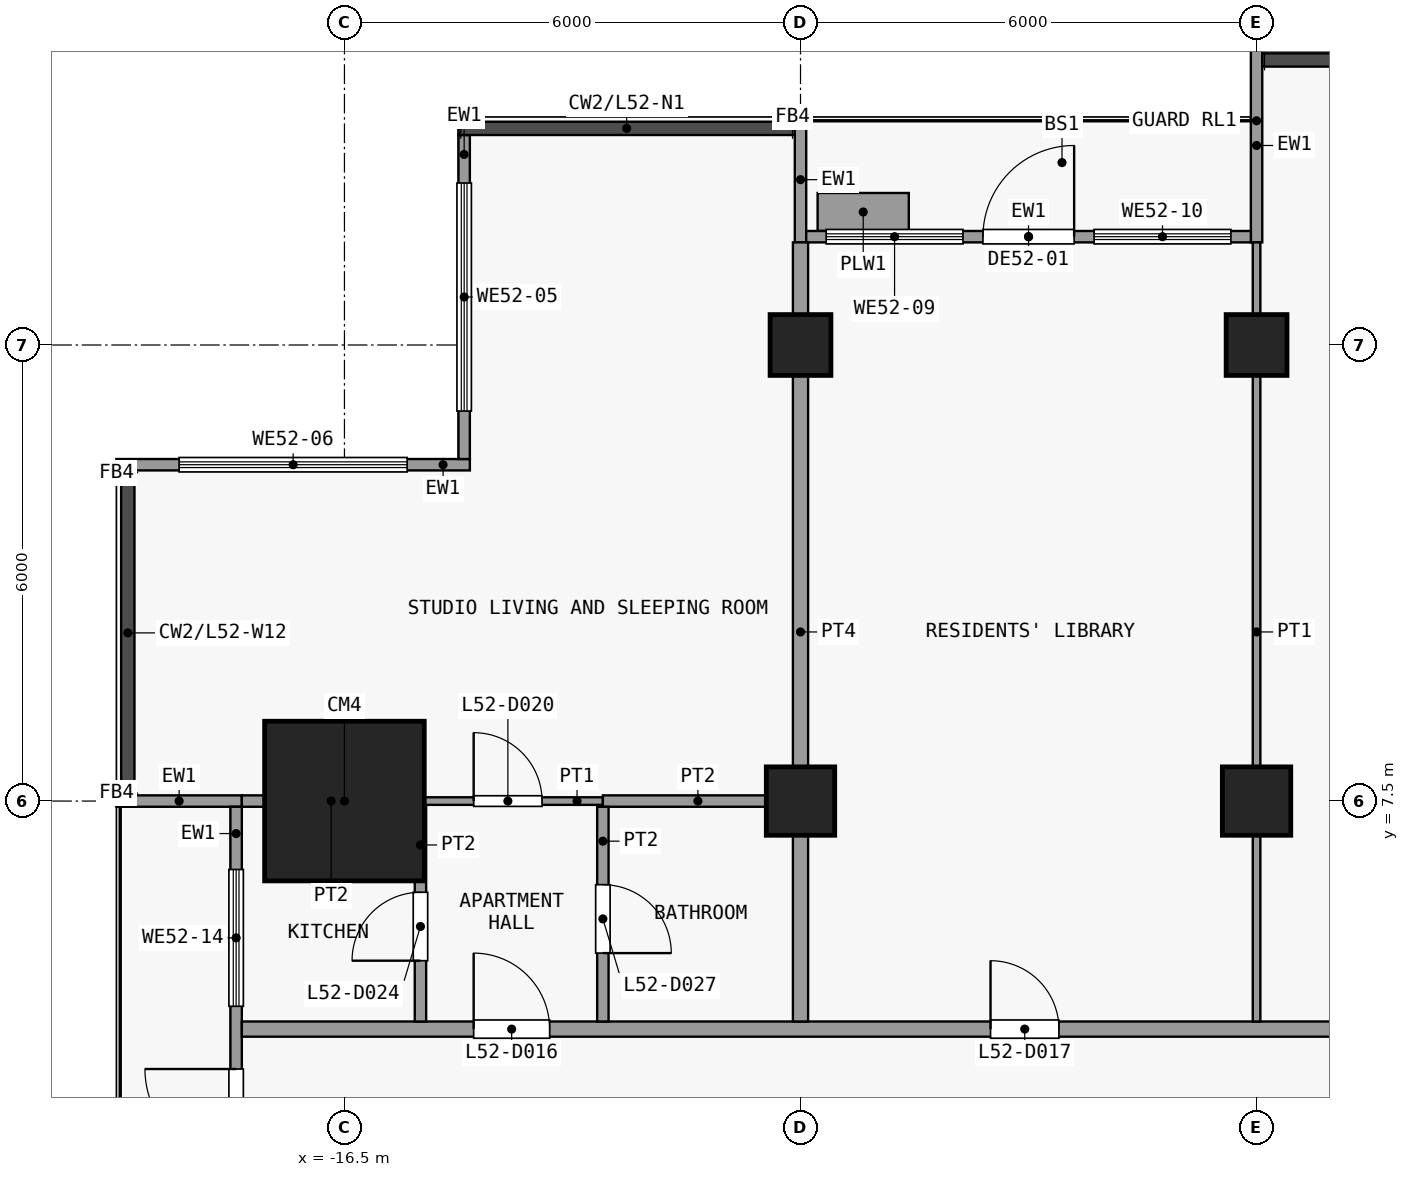
"""IFC4 building model, lengths in metres.
Left out: names, types, materials, properties, quantities, classifications, styles, units other than length and angle.
Written with IfcOpenShell. Run it as: python <this file> out.ifc"""

import sys

from ifc_helpers import new_model, si_unit, direction, frame, frame_2d, origin, origin_2d, place, context, subcontext, project, spatial, rectangle, extrude, element, fill, save


model = new_model("IFC4")
c1 = context("Model", 3, precision=1e-05, world=origin(), true_north=direction((0.0, 1.0)))
c2 = subcontext(c1, "Body", "Model", "MODEL_VIEW")
j1 = project(units=[si_unit("LENGTHUNIT", "METRE"), si_unit("PLANEANGLEUNIT", "RADIAN")], contexts=[c1])
p1 = place(None, origin())
s1 = spatial("IfcSite", under=j1, at=p1, CompositionType="ELEMENT")
p2 = place(p1, origin())
s2 = spatial("IfcBuilding", under=s1, at=p2, CompositionType="ELEMENT")
p3 = place(p2, frame((0.0, 0.0, 208.7)))
s3 = spatial("IfcBuildingStorey", under=s2, at=p3, CompositionType="ELEMENT", Elevation=208.7)
p4 = place(p3, frame((-16.5, 7.5, 0.0), z_axis=(0.0, 0.0, 1.0), x_axis=(1.0, 0.0, 0.0)))
e1 = element("IfcColumn", 1, at=p4, inside=s3, PredefinedType="COLUMN", context=c2, shape_type="SweptSolid", body=[
    extrude(rectangle(XDim=2.1, YDim=2.1, at=origin_2d()), origin(), (0.0, 0.0, 1.0), 3.6),
])
p5 = place(p3, frame((-10.5, 7.5, 0.0), z_axis=(0.0, 0.0, 1.0), x_axis=(1.0, 0.0, 0.0)))
e2 = element("IfcColumn", 2, at=p5, inside=s3, PredefinedType="COLUMN", context=c2, shape_type="SweptSolid", body=[
    extrude(rectangle(XDim=0.9, YDim=0.9, at=origin_2d()), origin(), (0.0, 0.0, 1.0), 3.6),
])
p6 = place(p3, frame((-10.5, 13.5, 0.0), z_axis=(0.0, 0.0, 1.0), x_axis=(1.0, 0.0, 0.0)))
e3 = element("IfcColumn", 3, at=p6, inside=s3, PredefinedType="COLUMN", context=c2, shape_type="SweptSolid", body=[
    extrude(rectangle(XDim=0.8, YDim=0.8, at=origin_2d()), origin(), (0.0, 0.0, 1.0), 3.6),
])
p7 = place(p3, frame((-4.5, 7.5, 0.0), z_axis=(0.0, 0.0, 1.0), x_axis=(1.0, 0.0, 0.0)))
e4 = element("IfcColumn", 4, at=p7, inside=s3, PredefinedType="COLUMN", context=c2, shape_type="SweptSolid", body=[
    extrude(rectangle(XDim=0.9, YDim=0.9, at=origin_2d()), origin(), (0.0, 0.0, 1.0), 3.6),
])
p8 = place(p3, frame((-4.5, 13.5, 0.0), z_axis=(0.0, 0.0, 1.0), x_axis=(1.0, 0.0, 0.0)))
e5 = element("IfcColumn", 5, at=p8, inside=s3, PredefinedType="COLUMN", context=c2, shape_type="SweptSolid", body=[
    extrude(rectangle(XDim=0.8, YDim=0.8, at=origin_2d()), origin(), (0.0, 0.0, 1.0), 3.6),
])
p9 = place(p3, frame((-14.925, 12.0, 0.0), z_axis=(0.0, 0.0, 1.0), x_axis=(0.0, 1.0, 0.0)))
e6 = element("IfcWall", 6, at=p9, inside=s3, PredefinedType="SOLIDWALL", context=c2, shape_type="SweptSolid", body=[
    extrude(rectangle(XDim=4.262, YDim=0.15, at=frame_2d((2.131, 0.0))), origin(), (0.0, 0.0, 1.0), 3.3),
])
p10 = place(p9, frame((0.631, 0.0, 0.9)))
e7 = element("IfcOpeningElement", 7, at=p10, cuts=e6, PredefinedType="OPENING", context=c2, shape_type="SweptSolid", body=[
    extrude(rectangle(XDim=3.0, YDim=2.4, at=frame_2d((1.5, 1.2))), frame((0.0, 0.085, 0.0), z_axis=(0.0, -1.0, 0.0), x_axis=(1.0, 0.0, 0.0)), (0.0, 0.0, 1.0), 0.17),
])
p11 = place(p3, frame((-19.5, 11.925, 0.0), z_axis=(0.0, 0.0, 1.0), x_axis=(1.0, 0.0, 0.0)))
e8 = element("IfcWall", 8, at=p11, inside=s3, PredefinedType="SOLIDWALL", context=c2, shape_type="SweptSolid", body=[
    extrude(rectangle(XDim=4.65, YDim=0.15, at=frame_2d((2.325, 0.0))), origin(), (0.0, 0.0, 1.0), 3.3),
])
p12 = place(p11, frame((0.825, 0.0, 0.9)))
e9 = element("IfcOpeningElement", 9, at=p12, cuts=e8, PredefinedType="OPENING", context=c2, shape_type="SweptSolid", body=[
    extrude(rectangle(XDim=3.0, YDim=2.4, at=frame_2d((1.5, 1.2))), frame((0.0, 0.085, 0.0), z_axis=(0.0, -1.0, 0.0), x_axis=(1.0, 0.0, 0.0)), (0.0, 0.0, 1.0), 0.17),
])
p13 = place(p3, frame((-10.5, 14.85, 0.0), z_axis=(0.0, 0.0, 1.0), x_axis=(0.0, 1.0, 0.0)))
e10 = element("IfcWall", 10, at=p13, inside=s3, PredefinedType="SOLIDWALL", context=c2, shape_type="SweptSolid", body=[
    extrude(rectangle(XDim=1.65, YDim=0.15, at=frame_2d((0.825, 0.0))), origin(), (0.0, 0.0, 1.0), 3.3),
])
p14 = place(p3, frame((-4.5, 14.85, 0.0), z_axis=(0.0, 0.0, 1.0), x_axis=(0.0, 1.0, 0.0)))
e11 = element("IfcWall", 11, at=p14, inside=s3, PredefinedType="SOLIDWALL", context=c2, shape_type="SweptSolid", body=[
    extrude(rectangle(XDim=2.55, YDim=0.15, at=frame_2d((1.275, 0.0))), origin(), (0.0, 0.0, 1.0), 3.3),
])
p15 = place(p3, frame((-10.425, 14.925, 0.0), z_axis=(0.0, 0.0, 1.0), x_axis=(1.0, 0.0, 0.0)))
e12 = element("IfcWall", 12, at=p15, inside=s3, PredefinedType="SOLIDWALL", context=c2, shape_type="SweptSolid", body=[
    extrude(rectangle(XDim=5.85, YDim=0.15, at=frame_2d((2.925, 0.0))), origin(), (0.0, 0.0, 1.0), 3.3),
])
p16 = place(p15, frame((2.325, 0.0, 0.0)))
e13 = element("IfcOpeningElement", 13, at=p16, cuts=e12, PredefinedType="OPENING", context=c2, shape_type="SweptSolid", body=[
    extrude(rectangle(XDim=1.2, YDim=2.4, at=frame_2d((0.6, 1.2))), frame((0.0, 0.085, 0.0), z_axis=(0.0, -1.0, 0.0), x_axis=(1.0, 0.0, 0.0)), (0.0, 0.0, 1.0), 0.17),
])
p17 = place(p15, frame((0.262, 0.0, 0.9)))
e14 = element("IfcOpeningElement", 14, at=p17, cuts=e12, PredefinedType="OPENING", context=c2, shape_type="SweptSolid", body=[
    extrude(rectangle(XDim=1.8, YDim=2.1, at=frame_2d((0.9, 1.05))), frame((0.0, 0.085, 0.0), z_axis=(0.0, -1.0, 0.0), x_axis=(1.0, 0.0, 0.0)), (0.0, 0.0, 1.0), 0.17),
])
p18 = place(p15, frame((3.788, 0.0, 0.9)))
e15 = element("IfcOpeningElement", 15, at=p18, cuts=e12, PredefinedType="OPENING", context=c2, shape_type="SweptSolid", body=[
    extrude(rectangle(XDim=1.8, YDim=2.1, at=frame_2d((0.9, 1.05))), frame((0.0, 0.085, 0.0), z_axis=(0.0, -1.0, 0.0), x_axis=(1.0, 0.0, 0.0)), (0.0, 0.0, 1.0), 0.17),
])
p19 = place(p3, frame((-10.275, 15.25, 0.0), z_axis=(0.0, 0.0, 1.0), x_axis=(1.0, 0.0, 0.0)))
e16 = element("IfcWall", 16, at=p19, inside=s3, PredefinedType="USERDEFINED", context=c2, shape_type="SweptSolid", body=[
    extrude(rectangle(XDim=1.2, YDim=0.5, at=frame_2d((0.6, 0.0))), origin(), (0.0, 0.0, 1.0), 0.9),
])
p20 = place(p3, frame((-17.85, 7.5, 0.0), z_axis=(0.0, 0.0, 1.0), x_axis=(-1.0, 0.0, 0.0)))
e17 = element("IfcWall", 17, at=p20, inside=s3, PredefinedType="SOLIDWALL", context=c2, shape_type="SweptSolid", body=[
    extrude(rectangle(XDim=1.65, YDim=0.15, at=frame_2d((0.825, 0.0))), origin(), (0.0, 0.0, 1.0), 3.3),
])
p21 = place(p3, frame((-17.925, 1.575, 0.0), z_axis=(0.0, 0.0, 1.0), x_axis=(0.0, 1.0, 0.0)))
e18 = element("IfcWall", 18, at=p21, inside=s3, PredefinedType="SOLIDWALL", context=c2, shape_type="SweptSolid", body=[
    extrude(rectangle(XDim=5.85, YDim=0.15, at=frame_2d((2.925, 0.0))), origin(), (0.0, 0.0, 1.0), 3.3),
])
p22 = place(p21, frame((1.2, 0.0, 0.0)))
e19 = element("IfcOpeningElement", 19, at=p22, cuts=e18, PredefinedType="OPENING", context=c2, shape_type="SweptSolid", body=[
    extrude(rectangle(XDim=1.2, YDim=2.4, at=frame_2d((0.6, 1.2))), frame((0.0, 0.085, 0.0), z_axis=(0.0, -1.0, 0.0), x_axis=(1.0, 0.0, 0.0)), (0.0, 0.0, 1.0), 0.17),
])
p23 = place(p21, frame((0.25, 0.0, 0.9)))
e20 = element("IfcOpeningElement", 20, at=p23, cuts=e18, PredefinedType="OPENING", context=c2, shape_type="SweptSolid", body=[
    extrude(rectangle(XDim=0.7, YDim=2.1, at=frame_2d((0.35, 1.05))), frame((0.0, 0.085, 0.0), z_axis=(0.0, -1.0, 0.0), x_axis=(1.0, 0.0, 0.0)), (0.0, 0.0, 1.0), 0.17),
])
p24 = place(p21, frame((3.225, 0.0, 0.9)))
e21 = element("IfcOpeningElement", 21, at=p24, cuts=e18, PredefinedType="OPENING", context=c2, shape_type="SweptSolid", body=[
    extrude(rectangle(XDim=1.8, YDim=2.1, at=frame_2d((0.9, 1.05))), frame((0.0, 0.085, 0.0), z_axis=(0.0, -1.0, 0.0), x_axis=(1.0, 0.0, 0.0)), (0.0, 0.0, 1.0), 0.17),
])
p25 = place(p3, frame((-17.85, 4.5, 0.0), z_axis=(0.0, 0.0, 1.0), x_axis=(1.0, 0.0, 0.0)))
e22 = element("IfcWall", 22, at=p25, inside=s3, PredefinedType="PARTITIONING", context=c2, shape_type="SweptSolid", body=[
    extrude(rectangle(XDim=38.1, YDim=0.2, at=frame_2d((19.05, 0.0))), origin(), (0.0, 0.0, 1.0), 3.3),
])
p26 = place(p25, frame((3.05, 0.0, 0.0)))
e23 = element("IfcOpeningElement", 23, at=p26, cuts=e22, PredefinedType="OPENING", context=c2, shape_type="SweptSolid", body=[
    extrude(rectangle(XDim=1.0, YDim=2.1, at=frame_2d((0.5, 1.05))), frame((0.0, 0.11, 0.0), z_axis=(0.0, -1.0, 0.0), x_axis=(1.0, 0.0, 0.0)), (0.0, 0.0, 1.0), 0.22),
])
p27 = place(p25, frame((9.85, 0.0, 0.0)))
e24 = element("IfcOpeningElement", 24, at=p27, cuts=e22, PredefinedType="OPENING", context=c2, shape_type="SweptSolid", body=[
    extrude(rectangle(XDim=0.9, YDim=2.1, at=frame_2d((0.45, 1.05))), frame((0.0, 0.11, 0.0), z_axis=(0.0, -1.0, 0.0), x_axis=(1.0, 0.0, 0.0)), (0.0, 0.0, 1.0), 0.22),
])
p28 = place(p25, frame((17.35, 0.0, 0.0)))
e25 = element("IfcOpeningElement", 25, at=p28, cuts=e22, PredefinedType="OPENING", context=c2, shape_type="SweptSolid", body=[
    extrude(rectangle(XDim=0.9, YDim=2.1, at=frame_2d((0.45, 1.05))), frame((0.0, 0.11, 0.0), z_axis=(0.0, -1.0, 0.0), x_axis=(1.0, 0.0, 0.0)), (0.0, 0.0, 1.0), 0.22),
])
p29 = place(p25, frame((29.05, 0.0, 0.0)))
e26 = element("IfcOpeningElement", 26, at=p29, cuts=e22, PredefinedType="OPENING", context=c2, shape_type="SweptSolid", body=[
    extrude(rectangle(XDim=1.0, YDim=2.1, at=frame_2d((0.5, 1.05))), frame((0.0, 0.11, 0.0), z_axis=(0.0, -1.0, 0.0), x_axis=(1.0, 0.0, 0.0)), (0.0, 0.0, 1.0), 0.22),
])
p30 = place(p3, frame((-15.5, 7.5, 0.0), z_axis=(0.0, 0.0, 1.0), x_axis=(1.0, 0.0, 0.0)))
e27 = element("IfcWall", 27, at=p30, inside=s3, PredefinedType="PARTITIONING", context=c2, shape_type="SweptSolid", body=[
    extrude(rectangle(XDim=2.4, YDim=0.1, at=frame_2d((1.2, 0.0))), origin(), (0.0, 0.0, 1.0), 3.3),
])
p31 = place(p30, frame((0.7, 0.0, 0.0)))
e28 = element("IfcOpeningElement", 28, at=p31, cuts=e27, PredefinedType="OPENING", context=c2, shape_type="SweptSolid", body=[
    extrude(rectangle(XDim=0.9, YDim=2.1, at=frame_2d((0.45, 1.05))), frame((0.0, 0.06, 0.0), z_axis=(0.0, -1.0, 0.0), x_axis=(1.0, 0.0, 0.0)), (0.0, 0.0, 1.0), 0.12),
])
p32 = place(p3, frame((-17.85, 7.5, 0.0), z_axis=(0.0, 0.0, 1.0), x_axis=(1.0, 0.0, 0.0)))
e29 = element("IfcWall", 29, at=p32, inside=s3, PredefinedType="PARTITIONING", context=c2, shape_type="SweptSolid", body=[
    extrude(rectangle(XDim=2.35, YDim=0.15, at=frame_2d((1.175, 0.0))), origin(), (0.0, 0.0, 1.0), 3.3),
])
p33 = place(p3, frame((-13.1, 7.5, 0.0), z_axis=(0.0, 0.0, 1.0), x_axis=(1.0, 0.0, 0.0)))
e30 = element("IfcWall", 30, at=p33, inside=s3, PredefinedType="PARTITIONING", context=c2, shape_type="SweptSolid", body=[
    extrude(rectangle(XDim=2.5, YDim=0.15, at=frame_2d((1.25, 0.0))), origin(), (0.0, 0.0, 1.0), 3.3),
])
p34 = place(p3, frame((-15.5, 4.6, 0.0), z_axis=(0.0, 0.0, 1.0), x_axis=(0.0, 1.0, 0.0)))
e31 = element("IfcWall", 31, at=p34, inside=s3, PredefinedType="PARTITIONING", context=c2, shape_type="SweptSolid", body=[
    extrude(rectangle(XDim=2.825, YDim=0.15, at=frame_2d((1.413, 0.0))), origin(), (0.0, 0.0, 1.0), 3.3),
])
p35 = place(p34, frame((0.8, 0.0, 0.0)))
e32 = element("IfcOpeningElement", 32, at=p35, cuts=e31, PredefinedType="OPENING", context=c2, shape_type="SweptSolid", body=[
    extrude(rectangle(XDim=0.9, YDim=2.1, at=frame_2d((0.45, 1.05))), frame((0.0, 0.085, 0.0), z_axis=(0.0, -1.0, 0.0), x_axis=(1.0, 0.0, 0.0)), (0.0, 0.0, 1.0), 0.17),
])
p36 = place(p3, frame((-13.1, 4.6, 0.0), z_axis=(0.0, 0.0, 1.0), x_axis=(0.0, 1.0, 0.0)))
e33 = element("IfcWall", 33, at=p36, inside=s3, PredefinedType="PARTITIONING", context=c2, shape_type="SweptSolid", body=[
    extrude(rectangle(XDim=2.825, YDim=0.15, at=frame_2d((1.413, 0.0))), origin(), (0.0, 0.0, 1.0), 3.3),
])
p37 = place(p36, frame((0.9, 0.0, 0.0)))
e34 = element("IfcOpeningElement", 34, at=p37, cuts=e33, PredefinedType="OPENING", context=c2, shape_type="SweptSolid", body=[
    extrude(rectangle(XDim=0.9, YDim=2.1, at=frame_2d((0.45, 1.05))), frame((0.0, 0.085, 0.0), z_axis=(0.0, -1.0, 0.0), x_axis=(1.0, 0.0, 0.0)), (0.0, 0.0, 1.0), 0.17),
])
p38 = place(p3, frame((-10.5, 4.6, 0.0), z_axis=(0.0, 0.0, 1.0), x_axis=(0.0, 1.0, 0.0)))
e35 = element("IfcWall", 35, at=p38, inside=s3, PredefinedType="PARTITIONING", context=c2, shape_type="SweptSolid", body=[
    extrude(rectangle(XDim=10.25, YDim=0.2, at=frame_2d((5.125, 0.0))), origin(), (0.0, 0.0, 1.0), 3.3),
])
p39 = place(p3, frame((-4.5, 4.6, 0.0), z_axis=(0.0, 0.0, 1.0), x_axis=(0.0, 1.0, 0.0)))
e36 = element("IfcWall", 36, at=p39, inside=s3, PredefinedType="PARTITIONING", context=c2, shape_type="SweptSolid", body=[
    extrude(rectangle(XDim=10.25, YDim=0.1, at=frame_2d((5.125, 0.0))), origin(), (0.0, 0.0, 1.0), 3.3),
])
p40 = place(p10, origin())
e37 = element("IfcWindow", 37, at=p40, inside=s3, PartitioningType="SINGLE_PANEL", PredefinedType="WINDOW", context=c2, shape_type="SweptSolid", body=[
    extrude(rectangle(XDim=3.0, YDim=2.4, at=frame_2d((1.5, 1.2))), frame((0.0, 0.03, 0.0), z_axis=(0.0, -1.0, 0.0), x_axis=(1.0, 0.0, 0.0)), (0.0, 0.0, 1.0), 0.06),
])
fill(e7, e37)
p41 = place(p12, origin())
e38 = element("IfcWindow", 38, at=p41, inside=s3, PartitioningType="SINGLE_PANEL", PredefinedType="WINDOW", context=c2, shape_type="SweptSolid", body=[
    extrude(rectangle(XDim=3.0, YDim=2.4, at=frame_2d((1.5, 1.2))), frame((0.0, 0.03, 0.0), z_axis=(0.0, -1.0, 0.0), x_axis=(1.0, 0.0, 0.0)), (0.0, 0.0, 1.0), 0.06),
])
fill(e9, e38)
p42 = place(p16, origin())
e39 = element("IfcDoor", 39, at=p42, inside=s3, OperationType="SINGLE_SWING_RIGHT", PredefinedType="DOOR", context=c2, shape_type="SweptSolid", body=[
    extrude(rectangle(XDim=1.2, YDim=2.4, at=frame_2d((0.6, 1.2))), frame((0.0, 0.025, 0.0), z_axis=(0.0, -1.0, 0.0), x_axis=(1.0, 0.0, 0.0)), (0.0, 0.0, 1.0), 0.05),
])
fill(e13, e39)
p43 = place(p17, origin())
e40 = element("IfcWindow", 40, at=p43, inside=s3, PartitioningType="SINGLE_PANEL", PredefinedType="WINDOW", context=c2, shape_type="SweptSolid", body=[
    extrude(rectangle(XDim=1.8, YDim=2.1, at=frame_2d((0.9, 1.05))), frame((0.0, 0.03, 0.0), z_axis=(0.0, -1.0, 0.0), x_axis=(1.0, 0.0, 0.0)), (0.0, 0.0, 1.0), 0.06),
])
fill(e14, e40)
p44 = place(p18, origin())
e41 = element("IfcWindow", 41, at=p44, inside=s3, PartitioningType="SINGLE_PANEL", PredefinedType="WINDOW", context=c2, shape_type="SweptSolid", body=[
    extrude(rectangle(XDim=1.8, YDim=2.1, at=frame_2d((0.9, 1.05))), frame((0.0, 0.03, 0.0), z_axis=(0.0, -1.0, 0.0), x_axis=(1.0, 0.0, 0.0)), (0.0, 0.0, 1.0), 0.06),
])
fill(e15, e41)
p45 = place(p22, origin())
e42 = element("IfcDoor", 42, at=p45, inside=s3, OperationType="SINGLE_SWING_RIGHT", PredefinedType="DOOR", context=c2, shape_type="SweptSolid", body=[
    extrude(rectangle(XDim=1.2, YDim=2.4, at=frame_2d((0.6, 1.2))), frame((0.0, 0.025, 0.0), z_axis=(0.0, -1.0, 0.0), x_axis=(1.0, 0.0, 0.0)), (0.0, 0.0, 1.0), 0.05),
])
fill(e19, e42)
p46 = place(p24, origin())
e43 = element("IfcWindow", 43, at=p46, inside=s3, PartitioningType="SINGLE_PANEL", PredefinedType="WINDOW", context=c2, shape_type="SweptSolid", body=[
    extrude(rectangle(XDim=1.8, YDim=2.1, at=frame_2d((0.9, 1.05))), frame((0.0, 0.03, 0.0), z_axis=(0.0, -1.0, 0.0), x_axis=(1.0, 0.0, 0.0)), (0.0, 0.0, 1.0), 0.06),
])
fill(e21, e43)
p47 = place(p26, origin())
e44 = element("IfcDoor", 44, at=p47, inside=s3, OperationType="SINGLE_SWING_RIGHT", PredefinedType="DOOR", context=c2, shape_type="SweptSolid", body=[
    extrude(rectangle(XDim=1.0, YDim=2.1, at=frame_2d((0.5, 1.05))), frame((0.0, 0.025, 0.0), z_axis=(0.0, -1.0, 0.0), x_axis=(1.0, 0.0, 0.0)), (0.0, 0.0, 1.0), 0.05),
])
fill(e23, e44)
p48 = place(p27, origin())
e45 = element("IfcDoor", 45, at=p48, inside=s3, OperationType="SINGLE_SWING_RIGHT", PredefinedType="DOOR", context=c2, shape_type="SweptSolid", body=[
    extrude(rectangle(XDim=0.9, YDim=2.1, at=frame_2d((0.45, 1.05))), frame((0.0, 0.025, 0.0), z_axis=(0.0, -1.0, 0.0), x_axis=(1.0, 0.0, 0.0)), (0.0, 0.0, 1.0), 0.05),
])
fill(e24, e45)
p49 = place(p31, origin())
e46 = element("IfcDoor", 46, at=p49, inside=s3, OperationType="SINGLE_SWING_RIGHT", PredefinedType="DOOR", context=c2, shape_type="SweptSolid", body=[
    extrude(rectangle(XDim=0.9, YDim=2.1, at=frame_2d((0.45, 1.05))), frame((0.0, 0.025, 0.0), z_axis=(0.0, -1.0, 0.0), x_axis=(1.0, 0.0, 0.0)), (0.0, 0.0, 1.0), 0.05),
])
fill(e28, e46)
p50 = place(p35, origin())
e47 = element("IfcDoor", 47, at=p50, inside=s3, OperationType="SINGLE_SWING_RIGHT", PredefinedType="DOOR", context=c2, shape_type="SweptSolid", body=[
    extrude(rectangle(XDim=0.9, YDim=2.1, at=frame_2d((0.45, 1.05))), frame((0.0, 0.025, 0.0), z_axis=(0.0, -1.0, 0.0), x_axis=(1.0, 0.0, 0.0)), (0.0, 0.0, 1.0), 0.05),
])
fill(e32, e47)
p51 = place(p37, origin())
e48 = element("IfcDoor", 48, at=p51, inside=s3, OperationType="SINGLE_SWING_LEFT", PredefinedType="DOOR", context=c2, shape_type="SweptSolid", body=[
    extrude(rectangle(XDim=0.9, YDim=2.1, at=frame_2d((0.45, 1.05))), frame((0.0, 0.025, 0.0), z_axis=(0.0, -1.0, 0.0), x_axis=(1.0, 0.0, 0.0)), (0.0, 0.0, 1.0), 0.05),
])
fill(e34, e48)
save(model, sys.argv[1])
